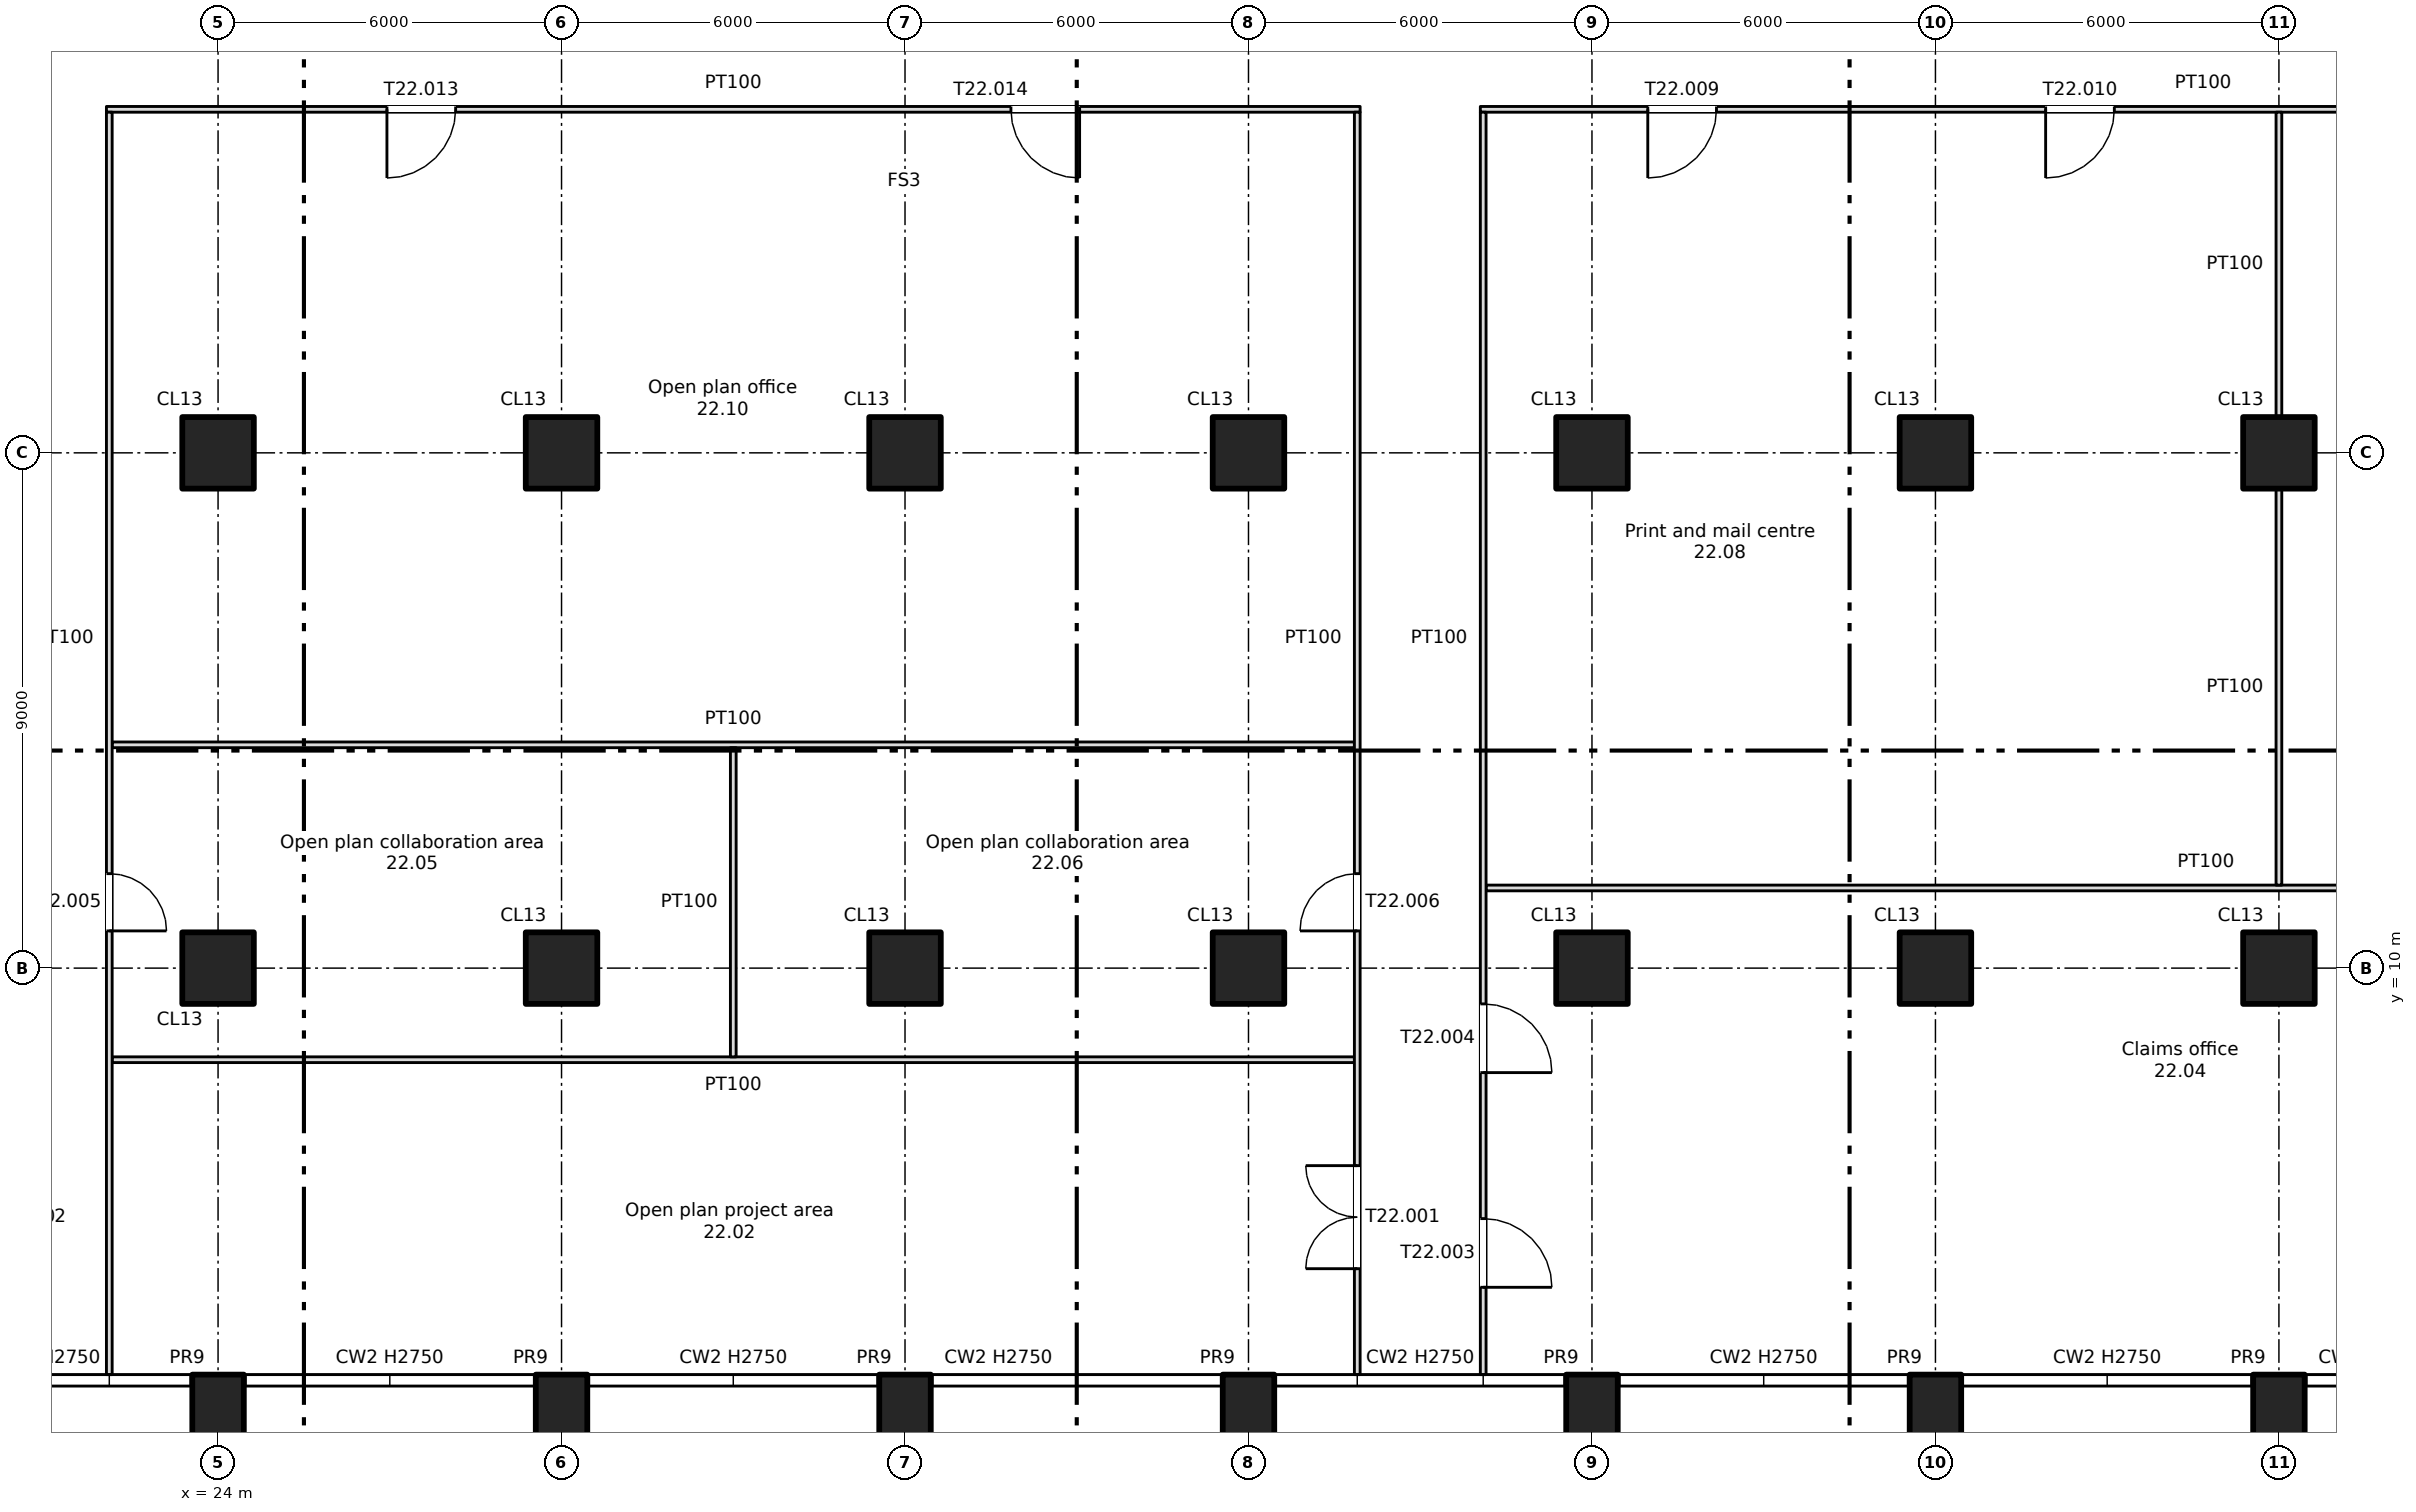
"""IFC4 building model, lengths in metres.
Left out: names, types, materials, properties, quantities, classifications, styles, units other than length and angle.
Written with IfcOpenShell. Run it as: python <this file> out.ifc"""

import sys

from ifc_helpers import new_model, si_unit, direction, frame, frame_2d, origin, origin_2d, place, context, subcontext, project, spatial, rectangle, extrude, element, fill, save


model = new_model("IFC4")
c1 = context("Model", 3, precision=1e-05, world=origin(), true_north=direction((0.0, 1.0)))
c2 = subcontext(c1, "Body", "Model", "MODEL_VIEW")
j1 = project(units=[si_unit("LENGTHUNIT", "METRE"), si_unit("PLANEANGLEUNIT", "RADIAN")], contexts=[c1])
p1 = place(None, origin())
s1 = spatial("IfcSite", under=j1, at=p1, CompositionType="ELEMENT")
p2 = place(p1, origin())
s2 = spatial("IfcBuilding", under=s1, at=p2, CompositionType="ELEMENT")
p3 = place(p2, frame((0.0, 0.0, 143.75)))
s3 = spatial("IfcBuildingStorey", under=s2, at=p3, CompositionType="ELEMENT", Elevation=143.75)
for number, where, z_axis, x_axis in (
    (1, (24.0, 2.2, -0.4), (0.0, 0.0, 1.0), (1.0, 0.0, 0.0)),
    (2, (30.0, 2.2, -0.4), (0.0, 0.0, 1.0), (1.0, 0.0, 0.0)),
    (3, (36.0, 2.2, -0.4), (0.0, 0.0, 1.0), (1.0, 0.0, 0.0)),
    (4, (42.0, 2.2, -0.4), (0.0, 0.0, 1.0), (1.0, 0.0, 0.0)),
    (5, (48.0, 2.2, -0.4), (0.0, 0.0, 1.0), (1.0, 0.0, 0.0)),
    (6, (54.0, 2.2, -0.4), (0.0, 0.0, 1.0), (1.0, 0.0, 0.0)),
    (7, (60.0, 2.2, -0.4), (0.0, 0.0, 1.0), (1.0, 0.0, 0.0)),
):
    element("IfcColumn", number, at=place(p3, frame(where, z_axis=z_axis, x_axis=x_axis)), inside=s3, PredefinedType="COLUMN", context=c2, shape_type="SweptSolid", body=[
        extrude(rectangle(XDim=0.9, YDim=1.4, at=origin_2d()), origin(), (0.0, 0.0, 1.0), 3.75),
    ])
for number, where, z_axis, x_axis in (
    (8, (24.0, 10.0, 0.0), (0.0, 0.0, 1.0), (1.0, 0.0, 0.0)),
    (9, (24.0, 19.0, 0.0), (0.0, 0.0, 1.0), (1.0, 0.0, 0.0)),
    (10, (30.0, 10.0, 0.0), (0.0, 0.0, 1.0), (1.0, 0.0, 0.0)),
    (11, (30.0, 19.0, 0.0), (0.0, 0.0, 1.0), (1.0, 0.0, 0.0)),
    (12, (36.0, 10.0, 0.0), (0.0, 0.0, 1.0), (1.0, 0.0, 0.0)),
    (13, (36.0, 19.0, 0.0), (0.0, 0.0, 1.0), (1.0, 0.0, 0.0)),
    (14, (42.0, 10.0, 0.0), (0.0, 0.0, 1.0), (1.0, 0.0, 0.0)),
    (15, (42.0, 19.0, 0.0), (0.0, 0.0, 1.0), (1.0, 0.0, 0.0)),
    (16, (48.0, 10.0, 0.0), (0.0, 0.0, 1.0), (1.0, 0.0, 0.0)),
    (17, (48.0, 19.0, 0.0), (0.0, 0.0, 1.0), (1.0, 0.0, 0.0)),
    (18, (54.0, 10.0, 0.0), (0.0, 0.0, 1.0), (1.0, 0.0, 0.0)),
    (19, (54.0, 19.0, 0.0), (0.0, 0.0, 1.0), (1.0, 0.0, 0.0)),
    (20, (60.0, 10.0, 0.0), (0.0, 0.0, 1.0), (1.0, 0.0, 0.0)),
    (21, (60.0, 19.0, 0.0), (0.0, 0.0, 1.0), (1.0, 0.0, 0.0)),
):
    element("IfcColumn", number, at=place(p3, frame(where, z_axis=z_axis, x_axis=x_axis)), inside=s3, PredefinedType="COLUMN", context=c2, shape_type="SweptSolid", body=[
        extrude(rectangle(XDim=1.25, YDim=1.25, at=origin_2d()), origin(), (0.0, 0.0, 1.0), 3.35),
    ])
p4 = place(p3, frame((22.15, 8.4, 0.0), z_axis=(0.0, 0.0, 1.0), x_axis=(1.0, 0.0, 0.0)))
e22 = element("IfcWall", 22, at=p4, inside=s3, PredefinedType="PARTITIONING", context=c2, shape_type="SweptSolid", body=[
    extrude(rectangle(XDim=21.7, YDim=0.1, at=frame_2d((10.85, 0.0))), origin(), (0.0, 0.0, 1.0), 3.35),
])
p5 = place(p3, frame((46.15, 11.4, 0.0), z_axis=(0.0, 0.0, 1.0), x_axis=(1.0, 0.0, 0.0)))
e23 = element("IfcWall", 23, at=p5, inside=s3, PredefinedType="PARTITIONING", context=c2, shape_type="SweptSolid", body=[
    extrude(rectangle(XDim=25.15, YDim=0.1, at=frame_2d((12.575, 0.0))), origin(), (0.0, 0.0, 1.0), 3.35),
])
p6 = place(p3, frame((22.15, 13.9, 0.0), z_axis=(0.0, 0.0, 1.0), x_axis=(1.0, 0.0, 0.0)))
e24 = element("IfcWall", 24, at=p6, inside=s3, PredefinedType="PARTITIONING", context=c2, shape_type="SweptSolid", body=[
    extrude(rectangle(XDim=21.7, YDim=0.1, at=frame_2d((10.85, 0.0))), origin(), (0.0, 0.0, 1.0), 3.35),
])
p7 = place(p3, frame((22.05, 25.0, 0.0), z_axis=(0.0, 0.0, 1.0), x_axis=(1.0, 0.0, 0.0)))
e25 = element("IfcWall", 25, at=p7, inside=s3, PredefinedType="PARTITIONING", context=c2, shape_type="SweptSolid", body=[
    extrude(rectangle(XDim=21.9, YDim=0.1, at=frame_2d((10.95, 0.0))), origin(), (0.0, 0.0, 1.0), 3.35),
])
p8 = place(p7, frame((4.9, 0.0, 0.0)))
e26 = element("IfcOpeningElement", 26, at=p8, cuts=e25, PredefinedType="OPENING", context=c2, shape_type="SweptSolid", body=[
    extrude(rectangle(XDim=1.2, YDim=2.1, at=frame_2d((0.6, 1.05))), frame((0.0, 0.06, 0.0), z_axis=(0.0, -1.0, 0.0), x_axis=(1.0, 0.0, 0.0)), (0.0, 0.0, 1.0), 0.12),
])
p9 = place(p7, frame((15.8, 0.0, 0.0)))
e27 = element("IfcOpeningElement", 27, at=p9, cuts=e25, PredefinedType="OPENING", context=c2, shape_type="SweptSolid", body=[
    extrude(rectangle(XDim=1.2, YDim=2.1, at=frame_2d((0.6, 1.05))), frame((0.0, 0.06, 0.0), z_axis=(0.0, -1.0, 0.0), x_axis=(1.0, 0.0, 0.0)), (0.0, 0.0, 1.0), 0.12),
])
p10 = place(p3, frame((46.05, 25.0, 0.0), z_axis=(0.0, 0.0, 1.0), x_axis=(1.0, 0.0, 0.0)))
e28 = element("IfcWall", 28, at=p10, inside=s3, PredefinedType="PARTITIONING", context=c2, shape_type="SweptSolid", body=[
    extrude(rectangle(XDim=25.25, YDim=0.1, at=frame_2d((12.625, 0.0))), origin(), (0.0, 0.0, 1.0), 3.35),
])
p11 = place(p10, frame((2.925, 0.0, 0.0)))
e29 = element("IfcOpeningElement", 29, at=p11, cuts=e28, PredefinedType="OPENING", context=c2, shape_type="SweptSolid", body=[
    extrude(rectangle(XDim=1.2, YDim=2.1, at=frame_2d((0.6, 1.05))), frame((0.0, 0.06, 0.0), z_axis=(0.0, -1.0, 0.0), x_axis=(1.0, 0.0, 0.0)), (0.0, 0.0, 1.0), 0.12),
])
p12 = place(p10, frame((9.875, 0.0, 0.0)))
e30 = element("IfcOpeningElement", 30, at=p12, cuts=e28, PredefinedType="OPENING", context=c2, shape_type="SweptSolid", body=[
    extrude(rectangle(XDim=1.2, YDim=2.1, at=frame_2d((0.6, 1.05))), frame((0.0, 0.06, 0.0), z_axis=(0.0, -1.0, 0.0), x_axis=(1.0, 0.0, 0.0)), (0.0, 0.0, 1.0), 0.12),
])
p13 = place(p10, frame((16.175, 0.0, 0.0)))
e31 = element("IfcOpeningElement", 31, at=p13, cuts=e28, PredefinedType="OPENING", context=c2, shape_type="SweptSolid", body=[
    extrude(rectangle(XDim=1.2, YDim=2.1, at=frame_2d((0.6, 1.05))), frame((0.0, 0.06, 0.0), z_axis=(0.0, -1.0, 0.0), x_axis=(1.0, 0.0, 0.0)), (0.0, 0.0, 1.0), 0.12),
])
p14 = place(p10, frame((21.825, 0.0, 0.0)))
e32 = element("IfcOpeningElement", 32, at=p14, cuts=e28, PredefinedType="OPENING", context=c2, shape_type="SweptSolid", body=[
    extrude(rectangle(XDim=1.2, YDim=2.1, at=frame_2d((0.6, 1.05))), frame((0.0, 0.06, 0.0), z_axis=(0.0, -1.0, 0.0), x_axis=(1.0, 0.0, 0.0)), (0.0, 0.0, 1.0), 0.12),
])
p15 = place(p3, frame((22.1, 2.9, 0.0), z_axis=(0.0, 0.0, 1.0), x_axis=(0.0, 1.0, 0.0)))
e33 = element("IfcWall", 33, at=p15, inside=s3, PredefinedType="PARTITIONING", context=c2, shape_type="SweptSolid", body=[
    extrude(rectangle(XDim=22.05, YDim=0.1, at=frame_2d((11.025, 0.0))), origin(), (0.0, 0.0, 1.0), 3.35),
])
p16 = place(p15, frame((7.75, 0.0, 0.0)))
e34 = element("IfcOpeningElement", 34, at=p16, cuts=e33, PredefinedType="OPENING", context=c2, shape_type="SweptSolid", body=[
    extrude(rectangle(XDim=1.0, YDim=2.1, at=frame_2d((0.5, 1.05))), frame((0.0, 0.06, 0.0), z_axis=(0.0, -1.0, 0.0), x_axis=(1.0, 0.0, 0.0)), (0.0, 0.0, 1.0), 0.12),
])
p17 = place(p3, frame((33.0, 8.45, 0.0), z_axis=(0.0, 0.0, 1.0), x_axis=(0.0, 1.0, 0.0)))
e35 = element("IfcWall", 35, at=p17, inside=s3, PredefinedType="PARTITIONING", context=c2, shape_type="SweptSolid", body=[
    extrude(rectangle(XDim=5.4, YDim=0.1, at=frame_2d((2.7, 0.0))), origin(), (0.0, 0.0, 1.0), 3.35),
])
p18 = place(p3, frame((43.9, 2.9, 0.0), z_axis=(0.0, 0.0, 1.0), x_axis=(0.0, 1.0, 0.0)))
e36 = element("IfcWall", 36, at=p18, inside=s3, PredefinedType="PARTITIONING", context=c2, shape_type="SweptSolid", body=[
    extrude(rectangle(XDim=22.05, YDim=0.1, at=frame_2d((11.025, 0.0))), origin(), (0.0, 0.0, 1.0), 3.35),
])
p19 = place(p18, frame((1.85, 0.0, 0.0)))
e37 = element("IfcOpeningElement", 37, at=p19, cuts=e36, PredefinedType="OPENING", context=c2, shape_type="SweptSolid", body=[
    extrude(rectangle(XDim=1.8, YDim=2.1, at=frame_2d((0.9, 1.05))), frame((0.0, 0.06, 0.0), z_axis=(0.0, -1.0, 0.0), x_axis=(1.0, 0.0, 0.0)), (0.0, 0.0, 1.0), 0.12),
])
p20 = place(p18, frame((7.75, 0.0, 0.0)))
e38 = element("IfcOpeningElement", 38, at=p20, cuts=e36, PredefinedType="OPENING", context=c2, shape_type="SweptSolid", body=[
    extrude(rectangle(XDim=1.0, YDim=2.1, at=frame_2d((0.5, 1.05))), frame((0.0, 0.06, 0.0), z_axis=(0.0, -1.0, 0.0), x_axis=(1.0, 0.0, 0.0)), (0.0, 0.0, 1.0), 0.12),
])
p21 = place(p3, frame((46.1, 2.9, 0.0), z_axis=(0.0, 0.0, 1.0), x_axis=(0.0, 1.0, 0.0)))
e39 = element("IfcWall", 39, at=p21, inside=s3, PredefinedType="PARTITIONING", context=c2, shape_type="SweptSolid", body=[
    extrude(rectangle(XDim=22.05, YDim=0.1, at=frame_2d((11.025, 0.0))), origin(), (0.0, 0.0, 1.0), 3.35),
])
p22 = place(p21, frame((1.525, 0.0, 0.0)))
e40 = element("IfcOpeningElement", 40, at=p22, cuts=e39, PredefinedType="OPENING", context=c2, shape_type="SweptSolid", body=[
    extrude(rectangle(XDim=1.2, YDim=2.1, at=frame_2d((0.6, 1.05))), frame((0.0, 0.06, 0.0), z_axis=(0.0, -1.0, 0.0), x_axis=(1.0, 0.0, 0.0)), (0.0, 0.0, 1.0), 0.12),
])
p23 = place(p21, frame((5.275, 0.0, 0.0)))
e41 = element("IfcOpeningElement", 41, at=p23, cuts=e39, PredefinedType="OPENING", context=c2, shape_type="SweptSolid", body=[
    extrude(rectangle(XDim=1.2, YDim=2.1, at=frame_2d((0.6, 1.05))), frame((0.0, 0.06, 0.0), z_axis=(0.0, -1.0, 0.0), x_axis=(1.0, 0.0, 0.0)), (0.0, 0.0, 1.0), 0.12),
])
p24 = place(p3, frame((60.0, 11.45, 0.0), z_axis=(0.0, 0.0, 1.0), x_axis=(0.0, 1.0, 0.0)))
e42 = element("IfcWall", 42, at=p24, inside=s3, PredefinedType="PARTITIONING", context=c2, shape_type="SweptSolid", body=[
    extrude(rectangle(XDim=6.925, YDim=0.1, at=frame_2d((3.462, 0.0))), origin(), (0.0, 0.0, 1.0), 3.35),
])
p25 = place(p3, frame((60.0, 19.625, 0.0), z_axis=(0.0, 0.0, 1.0), x_axis=(0.0, 1.0, 0.0)))
e43 = element("IfcWall", 43, at=p25, inside=s3, PredefinedType="PARTITIONING", context=c2, shape_type="SweptSolid", body=[
    extrude(rectangle(XDim=5.325, YDim=0.1, at=frame_2d((2.663, 0.0))), origin(), (0.0, 0.0, 1.0), 3.35),
])
p26 = place(p19, origin())
e44 = element("IfcDoor", 44, at=p26, inside=s3, OperationType="DOUBLE_DOOR_SINGLE_SWING", PredefinedType="DOOR", context=c2, shape_type="SweptSolid", body=[
    extrude(rectangle(XDim=1.8, YDim=2.1, at=frame_2d((0.9, 1.05))), frame((0.0, 0.025, 0.0), z_axis=(0.0, -1.0, 0.0), x_axis=(1.0, 0.0, 0.0)), (0.0, 0.0, 1.0), 0.05),
])
fill(e37, e44)
p27 = place(p22, origin())
e45 = element("IfcDoor", 45, at=p27, inside=s3, OperationType="SINGLE_SWING_LEFT", PredefinedType="DOOR", context=c2, shape_type="SweptSolid", body=[
    extrude(rectangle(XDim=1.2, YDim=2.1, at=frame_2d((0.6, 1.05))), frame((0.0, 0.025, 0.0), z_axis=(0.0, -1.0, 0.0), x_axis=(1.0, 0.0, 0.0)), (0.0, 0.0, 1.0), 0.05),
])
fill(e40, e45)
p28 = place(p23, origin())
e46 = element("IfcDoor", 46, at=p28, inside=s3, OperationType="SINGLE_SWING_LEFT", PredefinedType="DOOR", context=c2, shape_type="SweptSolid", body=[
    extrude(rectangle(XDim=1.2, YDim=2.1, at=frame_2d((0.6, 1.05))), frame((0.0, 0.025, 0.0), z_axis=(0.0, -1.0, 0.0), x_axis=(1.0, 0.0, 0.0)), (0.0, 0.0, 1.0), 0.05),
])
fill(e41, e46)
p29 = place(p16, origin())
e47 = element("IfcDoor", 47, at=p29, inside=s3, OperationType="SINGLE_SWING_LEFT", PredefinedType="DOOR", context=c2, shape_type="SweptSolid", body=[
    extrude(rectangle(XDim=1.0, YDim=2.1, at=frame_2d((0.5, 1.05))), frame((0.0, 0.025, 0.0), z_axis=(0.0, -1.0, 0.0), x_axis=(1.0, 0.0, 0.0)), (0.0, 0.0, 1.0), 0.05),
])
fill(e34, e47)
p30 = place(p20, origin())
e48 = element("IfcDoor", 48, at=p30, inside=s3, OperationType="SINGLE_SWING_LEFT", PredefinedType="DOOR", context=c2, shape_type="SweptSolid", body=[
    extrude(rectangle(XDim=1.0, YDim=2.1, at=frame_2d((0.5, 1.05))), frame((0.0, 0.025, 0.0), z_axis=(0.0, -1.0, 0.0), x_axis=(1.0, 0.0, 0.0)), (0.0, 0.0, 1.0), 0.05),
])
fill(e38, e48)
p31 = place(p11, origin())
e49 = element("IfcDoor", 49, at=p31, inside=s3, OperationType="SINGLE_SWING_LEFT", PredefinedType="DOOR", context=c2, shape_type="SweptSolid", body=[
    extrude(rectangle(XDim=1.2, YDim=2.1, at=frame_2d((0.6, 1.05))), frame((0.0, 0.025, 0.0), z_axis=(0.0, -1.0, 0.0), x_axis=(1.0, 0.0, 0.0)), (0.0, 0.0, 1.0), 0.05),
])
fill(e29, e49)
p32 = place(p12, origin())
e50 = element("IfcDoor", 50, at=p32, inside=s3, OperationType="SINGLE_SWING_LEFT", PredefinedType="DOOR", context=c2, shape_type="SweptSolid", body=[
    extrude(rectangle(XDim=1.2, YDim=2.1, at=frame_2d((0.6, 1.05))), frame((0.0, 0.025, 0.0), z_axis=(0.0, -1.0, 0.0), x_axis=(1.0, 0.0, 0.0)), (0.0, 0.0, 1.0), 0.05),
])
fill(e30, e50)
p33 = place(p8, origin())
e51 = element("IfcDoor", 51, at=p33, inside=s3, OperationType="SINGLE_SWING_LEFT", PredefinedType="DOOR", context=c2, shape_type="SweptSolid", body=[
    extrude(rectangle(XDim=1.2, YDim=2.1, at=frame_2d((0.6, 1.05))), frame((0.0, 0.025, 0.0), z_axis=(0.0, -1.0, 0.0), x_axis=(1.0, 0.0, 0.0)), (0.0, 0.0, 1.0), 0.05),
])
fill(e26, e51)
p34 = place(p9, origin())
e52 = element("IfcDoor", 52, at=p34, inside=s3, OperationType="SINGLE_SWING_RIGHT", PredefinedType="DOOR", context=c2, shape_type="SweptSolid", body=[
    extrude(rectangle(XDim=1.2, YDim=2.1, at=frame_2d((0.6, 1.05))), frame((0.0, 0.025, 0.0), z_axis=(0.0, -1.0, 0.0), x_axis=(1.0, 0.0, 0.0)), (0.0, 0.0, 1.0), 0.05),
])
fill(e27, e52)
save(model, sys.argv[1])
